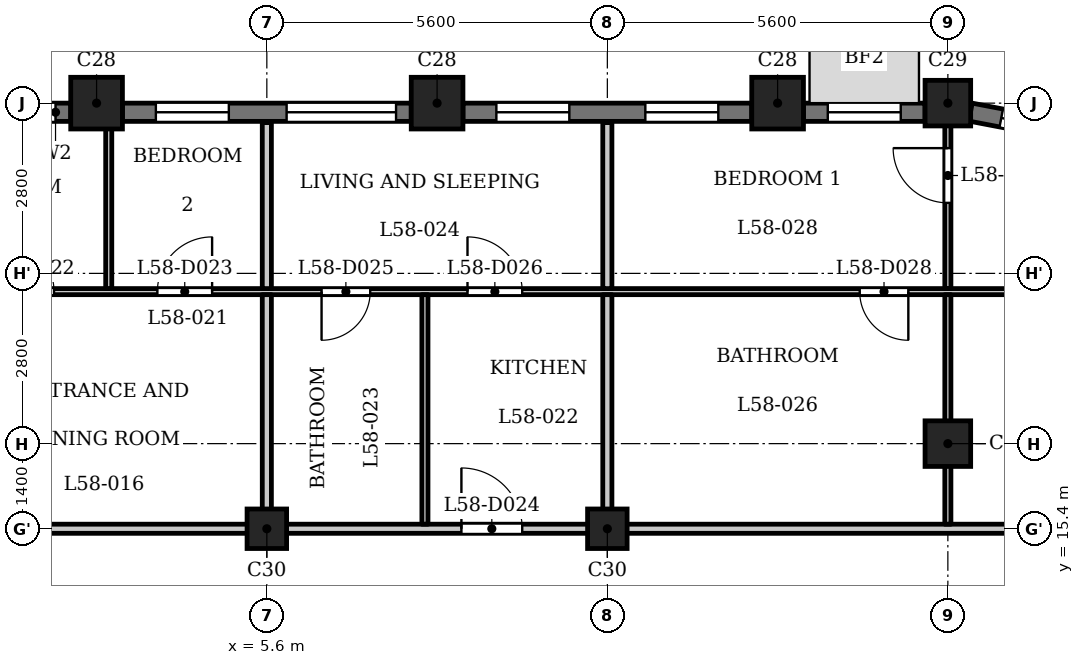
"""IFC4 building model, lengths in metres.
Left out: names, types, materials, properties, quantities, classifications, styles, units other than length and angle.
Written with IfcOpenShell. Run it as: python <this file> out.ifc"""

import sys

from ifc_helpers import new_model, si_unit, direction, frame, frame_2d, origin, origin_2d, place, context, subcontext, project, spatial, rectangle, extrude, element, fill, save


model = new_model("IFC4")
c1 = context("Model", 3, precision=1e-05, world=origin(), true_north=direction((0.0, 1.0)))
c2 = subcontext(c1, "Body", "Model", "MODEL_VIEW")
j1 = project(units=[si_unit("LENGTHUNIT", "METRE"), si_unit("PLANEANGLEUNIT", "RADIAN")], contexts=[c1])
p1 = place(None, origin())
s1 = spatial("IfcSite", under=j1, at=p1, CompositionType="ELEMENT")
p2 = place(p1, origin())
s2 = spatial("IfcBuilding", under=s1, at=p2, CompositionType="ELEMENT")
p3 = place(p2, frame((0.0, 0.0, 223.9)))
s3 = spatial("IfcBuildingStorey", under=s2, at=p3, CompositionType="ELEMENT", Elevation=223.9)
for number, where, z_axis, x_axis in (
    (1, (14.0, 22.4, 0.0), (0.0, 0.0, 1.0), (1.0, 0.0, 0.0)),
    (2, (8.4, 22.4, 0.0), (0.0, 0.0, 1.0), (1.0, 0.0, 0.0)),
    (3, (2.8, 22.4, 0.0), (0.0, 0.0, 1.0), (1.0, 0.0, 0.0)),
):
    element("IfcColumn", number, at=place(p3, frame(where, z_axis=z_axis, x_axis=x_axis)), inside=s3, PredefinedType="COLUMN", context=c2, shape_type="SweptSolid", body=[
        extrude(rectangle(XDim=0.85, YDim=0.85, at=origin_2d()), origin(), (0.0, 0.0, 1.0), 3.5),
    ])
for number, where, z_axis, x_axis in (
    (4, (16.8, 16.8, 0.0), (0.0, 0.0, 1.0), (1.0, 0.0, 0.0)),
    (5, (16.8, 22.4, 0.0), (0.0, 0.0, 1.0), (1.0, 0.0, 0.0)),
):
    element("IfcColumn", number, at=place(p3, frame(where, z_axis=z_axis, x_axis=x_axis)), inside=s3, PredefinedType="COLUMN", context=c2, shape_type="SweptSolid", body=[
        extrude(rectangle(XDim=0.75, YDim=0.75, at=origin_2d()), origin(), (0.0, 0.0, 1.0), 3.5),
    ])
for number, where, z_axis, x_axis in (
    (6, (5.6, 15.4, 0.0), (0.0, 0.0, 1.0), (1.0, 0.0, 0.0)),
    (7, (11.2, 15.4, 0.0), (0.0, 0.0, 1.0), (1.0, 0.0, 0.0)),
):
    element("IfcColumn", number, at=place(p3, frame(where, z_axis=z_axis, x_axis=x_axis)), inside=s3, PredefinedType="COLUMN", context=c2, shape_type="SweptSolid", body=[
        extrude(rectangle(XDim=0.65, YDim=0.65, at=origin_2d()), origin(), (0.0, 0.0, 1.0), 3.5),
    ])
p4 = place(p3, frame((18.971, 21.91, 0.0), z_axis=(0.0, 0.0, 1.0), x_axis=(-0.982300037503, 0.187314271538, 0.0)))
e8 = element("IfcWall", 8, at=p4, inside=s3, PredefinedType="SOLIDWALL", context=c2, shape_type="SweptSolid", body=[
    extrude(rectangle(XDim=1.831, YDim=0.3, at=frame_2d((0.916, 0.0))), origin(), (0.0, 0.0, 1.0), 2.5),
])
p5 = place(p4, frame((0.516, 0.0, 0.6)))
e9 = element("IfcOpeningElement", 9, at=p5, cuts=e8, PredefinedType="OPENING", context=c2, shape_type="SweptSolid", body=[
    extrude(rectangle(XDim=0.8, YDim=1.55, at=frame_2d((0.4, 0.775))), frame((0.0, 0.16, 0.0), z_axis=(0.0, -1.0, 0.0), x_axis=(1.0, 0.0, 0.0)), (0.0, 0.0, 1.0), 0.32),
])
p6 = place(p3, frame((16.425, 22.25, 0.0), z_axis=(0.0, 0.0, 1.0), x_axis=(-1.0, 0.0, 0.0)))
e10 = element("IfcWall", 10, at=p6, inside=s3, PredefinedType="SOLIDWALL", context=c2, shape_type="SweptSolid", body=[
    extrude(rectangle(XDim=2.0, YDim=0.3, at=frame_2d((1.0, 0.0))), origin(), (0.0, 0.0, 1.0), 2.5),
])
p7 = place(p6, frame((0.4, 0.0, 0.6)))
e11 = element("IfcOpeningElement", 11, at=p7, cuts=e10, PredefinedType="OPENING", context=c2, shape_type="SweptSolid", body=[
    extrude(rectangle(XDim=1.2, YDim=1.55, at=frame_2d((0.6, 0.775))), frame((0.0, 0.16, 0.0), z_axis=(0.0, -1.0, 0.0), x_axis=(1.0, 0.0, 0.0)), (0.0, 0.0, 1.0), 0.32),
])
p8 = place(p3, frame((13.575, 22.25, 0.0), z_axis=(0.0, 0.0, 1.0), x_axis=(-1.0, 0.0, 0.0)))
e12 = element("IfcWall", 12, at=p8, inside=s3, PredefinedType="SOLIDWALL", context=c2, shape_type="SweptSolid", body=[
    extrude(rectangle(XDim=4.75, YDim=0.3, at=frame_2d((2.375, 0.0))), origin(), (0.0, 0.0, 1.0), 2.5),
])
p9 = place(p8, frame((0.55, 0.0, 0.6)))
e13 = element("IfcOpeningElement", 13, at=p9, cuts=e12, PredefinedType="OPENING", context=c2, shape_type="SweptSolid", body=[
    extrude(rectangle(XDim=1.2, YDim=1.55, at=frame_2d((0.6, 0.775))), frame((0.0, 0.16, 0.0), z_axis=(0.0, -1.0, 0.0), x_axis=(1.0, 0.0, 0.0)), (0.0, 0.0, 1.0), 0.32),
])
p10 = place(p8, frame((3.0, 0.0, 0.6)))
e14 = element("IfcOpeningElement", 14, at=p10, cuts=e12, PredefinedType="OPENING", context=c2, shape_type="SweptSolid", body=[
    extrude(rectangle(XDim=1.2, YDim=1.55, at=frame_2d((0.6, 0.775))), frame((0.0, 0.16, 0.0), z_axis=(0.0, -1.0, 0.0), x_axis=(1.0, 0.0, 0.0)), (0.0, 0.0, 1.0), 0.32),
])
p11 = place(p3, frame((7.975, 22.25, 0.0), z_axis=(0.0, 0.0, 1.0), x_axis=(-1.0, 0.0, 0.0)))
e15 = element("IfcWall", 15, at=p11, inside=s3, PredefinedType="SOLIDWALL", context=c2, shape_type="SweptSolid", body=[
    extrude(rectangle(XDim=4.75, YDim=0.3, at=frame_2d((2.375, 0.0))), origin(), (0.0, 0.0, 1.0), 2.5),
])
p12 = place(p11, frame((0.25, 0.0, 0.9)))
e16 = element("IfcOpeningElement", 16, at=p12, cuts=e15, PredefinedType="OPENING", context=c2, shape_type="SweptSolid", body=[
    extrude(rectangle(XDim=1.8, YDim=1.25, at=frame_2d((0.9, 0.625))), frame((0.0, 0.16, 0.0), z_axis=(0.0, -1.0, 0.0), x_axis=(1.0, 0.0, 0.0)), (0.0, 0.0, 1.0), 0.32),
])
p13 = place(p11, frame((3.0, 0.0, 0.6)))
e17 = element("IfcOpeningElement", 17, at=p13, cuts=e15, PredefinedType="OPENING", context=c2, shape_type="SweptSolid", body=[
    extrude(rectangle(XDim=1.2, YDim=1.55, at=frame_2d((0.6, 0.775))), frame((0.0, 0.16, 0.0), z_axis=(0.0, -1.0, 0.0), x_axis=(1.0, 0.0, 0.0)), (0.0, 0.0, 1.0), 0.32),
])
p14 = place(p3, frame((2.375, 22.25, 0.0), z_axis=(0.0, 0.0, 1.0), x_axis=(-1.0, 0.0, 0.0)))
e18 = element("IfcWall", 18, at=p14, inside=s3, PredefinedType="SOLIDWALL", context=c2, shape_type="SweptSolid", body=[
    extrude(rectangle(XDim=4.75, YDim=0.3, at=frame_2d((2.375, 0.0))), origin(), (0.0, 0.0, 1.0), 2.5),
])
p15 = place(p14, frame((0.25, 0.0, 0.9)))
e19 = element("IfcOpeningElement", 19, at=p15, cuts=e18, PredefinedType="OPENING", context=c2, shape_type="SweptSolid", body=[
    extrude(rectangle(XDim=1.8, YDim=1.25, at=frame_2d((0.9, 0.625))), frame((0.0, 0.16, 0.0), z_axis=(0.0, -1.0, 0.0), x_axis=(1.0, 0.0, 0.0)), (0.0, 0.0, 1.0), 0.32),
])
p16 = place(p14, frame((2.7, 0.0, 0.9)))
e20 = element("IfcOpeningElement", 20, at=p16, cuts=e18, PredefinedType="OPENING", context=c2, shape_type="SweptSolid", body=[
    extrude(rectangle(XDim=1.8, YDim=1.25, at=frame_2d((0.9, 0.625))), frame((0.0, 0.16, 0.0), z_axis=(0.0, -1.0, 0.0), x_axis=(1.0, 0.0, 0.0)), (0.0, 0.0, 1.0), 0.32),
])
p17 = place(p3, frame((-24.684, 15.4, 0.0), z_axis=(0.0, 0.0, 1.0), x_axis=(1.0, 0.0, 0.0)))
e21 = element("IfcWall", 21, at=p17, inside=s3, PredefinedType="PARTITIONING", context=c2, shape_type="SweptSolid", body=[
    extrude(rectangle(XDim=49.368, YDim=0.15, at=frame_2d((24.684, 0.0))), origin(), (0.0, 0.0, 1.0), 3.2),
])
p18 = place(p17, frame((6.234, 0.0, 0.0)))
e22 = element("IfcOpeningElement", 22, at=p18, cuts=e21, PredefinedType="OPENING", context=c2, shape_type="SweptSolid", body=[
    extrude(rectangle(XDim=1.0, YDim=2.1, at=frame_2d((0.5, 1.05))), frame((0.0, 0.085, 0.0), z_axis=(0.0, -1.0, 0.0), x_axis=(1.0, 0.0, 0.0)), (0.0, 0.0, 1.0), 0.17),
])
p19 = place(p17, frame((17.434, 0.0, 0.0)))
e23 = element("IfcOpeningElement", 23, at=p19, cuts=e21, PredefinedType="OPENING", context=c2, shape_type="SweptSolid", body=[
    extrude(rectangle(XDim=1.0, YDim=2.1, at=frame_2d((0.5, 1.05))), frame((0.0, 0.085, 0.0), z_axis=(0.0, -1.0, 0.0), x_axis=(1.0, 0.0, 0.0)), (0.0, 0.0, 1.0), 0.17),
])
p20 = place(p17, frame((25.384, 0.0, 0.0)))
e24 = element("IfcOpeningElement", 24, at=p20, cuts=e21, PredefinedType="OPENING", context=c2, shape_type="SweptSolid", body=[
    extrude(rectangle(XDim=1.0, YDim=2.1, at=frame_2d((0.5, 1.05))), frame((0.0, 0.085, 0.0), z_axis=(0.0, -1.0, 0.0), x_axis=(1.0, 0.0, 0.0)), (0.0, 0.0, 1.0), 0.17),
])
p21 = place(p17, frame((33.484, 0.0, 0.0)))
e25 = element("IfcOpeningElement", 25, at=p21, cuts=e21, PredefinedType="OPENING", context=c2, shape_type="SweptSolid", body=[
    extrude(rectangle(XDim=1.0, YDim=2.1, at=frame_2d((0.5, 1.05))), frame((0.0, 0.085, 0.0), z_axis=(0.0, -1.0, 0.0), x_axis=(1.0, 0.0, 0.0)), (0.0, 0.0, 1.0), 0.17),
])
p22 = place(p17, frame((47.225, 0.0, 0.0)))
e26 = element("IfcOpeningElement", 26, at=p22, cuts=e21, PredefinedType="OPENING", context=c2, shape_type="SweptSolid", body=[
    extrude(rectangle(XDim=1.0, YDim=2.1, at=frame_2d((0.5, 1.05))), frame((0.0, 0.085, 0.0), z_axis=(0.0, -1.0, 0.0), x_axis=(1.0, 0.0, 0.0)), (0.0, 0.0, 1.0), 0.17),
])
p23 = place(p3, frame((-22.256, 19.3, 0.0), z_axis=(0.0, 0.0, 1.0), x_axis=(1.0, 0.0, 0.0)))
e27 = element("IfcWall", 27, at=p23, inside=s3, PredefinedType="PARTITIONING", context=c2, shape_type="SweptSolid", body=[
    extrude(rectangle(XDim=44.511, YDim=0.1, at=frame_2d((22.256, 0.0))), origin(), (0.0, 0.0, 1.0), 3.2),
])
p24 = place(p23, frame((9.606, 0.0, 0.0)))
e28 = element("IfcOpeningElement", 28, at=p24, cuts=e27, PredefinedType="OPENING", context=c2, shape_type="SweptSolid", body=[
    extrude(rectangle(XDim=0.8, YDim=2.1, at=frame_2d((0.4, 1.05))), frame((0.0, 0.06, 0.0), z_axis=(0.0, -1.0, 0.0), x_axis=(1.0, 0.0, 0.0)), (0.0, 0.0, 1.0), 0.12),
])
p25 = place(p23, frame((3.906, 0.0, 0.0)))
e29 = element("IfcOpeningElement", 29, at=p25, cuts=e27, PredefinedType="OPENING", context=c2, shape_type="SweptSolid", body=[
    extrude(rectangle(XDim=0.9, YDim=2.1, at=frame_2d((0.45, 1.05))), frame((0.0, 0.06, 0.0), z_axis=(0.0, -1.0, 0.0), x_axis=(1.0, 0.0, 0.0)), (0.0, 0.0, 1.0), 0.12),
])
p26 = place(p23, frame((11.706, 0.0, 0.0)))
e30 = element("IfcOpeningElement", 30, at=p26, cuts=e27, PredefinedType="OPENING", context=c2, shape_type="SweptSolid", body=[
    extrude(rectangle(XDim=0.8, YDim=2.1, at=frame_2d((0.4, 1.05))), frame((0.0, 0.06, 0.0), z_axis=(0.0, -1.0, 0.0), x_axis=(1.0, 0.0, 0.0)), (0.0, 0.0, 1.0), 0.12),
])
p27 = place(p23, frame((15.106, 0.0, 0.0)))
e31 = element("IfcOpeningElement", 31, at=p27, cuts=e27, PredefinedType="OPENING", context=c2, shape_type="SweptSolid", body=[
    extrude(rectangle(XDim=0.9, YDim=2.1, at=frame_2d((0.45, 1.05))), frame((0.0, 0.06, 0.0), z_axis=(0.0, -1.0, 0.0), x_axis=(1.0, 0.0, 0.0)), (0.0, 0.0, 1.0), 0.12),
])
p28 = place(p23, frame((17.556, 0.0, 0.0)))
e32 = element("IfcOpeningElement", 32, at=p28, cuts=e27, PredefinedType="OPENING", context=c2, shape_type="SweptSolid", body=[
    extrude(rectangle(XDim=0.8, YDim=2.1, at=frame_2d((0.4, 1.05))), frame((0.0, 0.06, 0.0), z_axis=(0.0, -1.0, 0.0), x_axis=(1.0, 0.0, 0.0)), (0.0, 0.0, 1.0), 0.12),
])
p29 = place(p23, frame((19.956, 0.0, 0.0)))
e33 = element("IfcOpeningElement", 33, at=p29, cuts=e27, PredefinedType="OPENING", context=c2, shape_type="SweptSolid", body=[
    extrude(rectangle(XDim=0.9, YDim=2.1, at=frame_2d((0.45, 1.05))), frame((0.0, 0.06, 0.0), z_axis=(0.0, -1.0, 0.0), x_axis=(1.0, 0.0, 0.0)), (0.0, 0.0, 1.0), 0.12),
])
p30 = place(p23, frame((23.456, 0.0, 0.0)))
e34 = element("IfcOpeningElement", 34, at=p30, cuts=e27, PredefinedType="OPENING", context=c2, shape_type="SweptSolid", body=[
    extrude(rectangle(XDim=0.9, YDim=2.1, at=frame_2d((0.45, 1.05))), frame((0.0, 0.06, 0.0), z_axis=(0.0, -1.0, 0.0), x_axis=(1.0, 0.0, 0.0)), (0.0, 0.0, 1.0), 0.12),
])
p31 = place(p23, frame((26.056, 0.0, 0.0)))
e35 = element("IfcOpeningElement", 35, at=p31, cuts=e27, PredefinedType="OPENING", context=c2, shape_type="SweptSolid", body=[
    extrude(rectangle(XDim=0.9, YDim=2.1, at=frame_2d((0.45, 1.05))), frame((0.0, 0.06, 0.0), z_axis=(0.0, -1.0, 0.0), x_axis=(1.0, 0.0, 0.0)), (0.0, 0.0, 1.0), 0.12),
])
p32 = place(p23, frame((28.756, 0.0, 0.0)))
e36 = element("IfcOpeningElement", 36, at=p32, cuts=e27, PredefinedType="OPENING", context=c2, shape_type="SweptSolid", body=[
    extrude(rectangle(XDim=0.8, YDim=2.1, at=frame_2d((0.4, 1.05))), frame((0.0, 0.06, 0.0), z_axis=(0.0, -1.0, 0.0), x_axis=(1.0, 0.0, 0.0)), (0.0, 0.0, 1.0), 0.12),
])
p33 = place(p23, frame((31.156, 0.0, 0.0)))
e37 = element("IfcOpeningElement", 37, at=p33, cuts=e27, PredefinedType="OPENING", context=c2, shape_type="SweptSolid", body=[
    extrude(rectangle(XDim=0.9, YDim=2.1, at=frame_2d((0.45, 1.05))), frame((0.0, 0.06, 0.0), z_axis=(0.0, -1.0, 0.0), x_axis=(1.0, 0.0, 0.0)), (0.0, 0.0, 1.0), 0.12),
])
p34 = place(p23, frame((37.606, 0.0, 0.0)))
e38 = element("IfcOpeningElement", 38, at=p34, cuts=e27, PredefinedType="OPENING", context=c2, shape_type="SweptSolid", body=[
    extrude(rectangle(XDim=0.8, YDim=2.1, at=frame_2d((0.4, 1.05))), frame((0.0, 0.06, 0.0), z_axis=(0.0, -1.0, 0.0), x_axis=(1.0, 0.0, 0.0)), (0.0, 0.0, 1.0), 0.12),
])
p35 = place(p23, frame((42.028, 0.0, 0.0)))
e39 = element("IfcOpeningElement", 39, at=p35, cuts=e27, PredefinedType="OPENING", context=c2, shape_type="SweptSolid", body=[
    extrude(rectangle(XDim=0.9, YDim=2.1, at=frame_2d((0.45, 1.05))), frame((0.0, 0.06, 0.0), z_axis=(0.0, -1.0, 0.0), x_axis=(1.0, 0.0, 0.0)), (0.0, 0.0, 1.0), 0.12),
])
p36 = place(p3, frame((3.0, 19.35, 0.0), z_axis=(0.0, 0.0, 1.0), x_axis=(0.0, 1.0, 0.0)))
e40 = element("IfcWall", 40, at=p36, inside=s3, PredefinedType="PARTITIONING", context=c2, shape_type="SweptSolid", body=[
    extrude(rectangle(XDim=3.455, YDim=0.1, at=frame_2d((1.728, 0.0))), origin(), (0.0, 0.0, 1.0), 3.2),
])
p37 = place(p3, frame((5.6, 15.475, 0.0), z_axis=(0.0, 0.0, 1.0), x_axis=(0.0, 1.0, 0.0)))
e41 = element("IfcWall", 41, at=p37, inside=s3, PredefinedType="PARTITIONING", context=c2, shape_type="SweptSolid", body=[
    extrude(rectangle(XDim=3.775, YDim=0.15, at=frame_2d((1.887, 0.0))), origin(), (0.0, 0.0, 1.0), 3.2),
])
p38 = place(p3, frame((5.6, 19.35, 0.0), z_axis=(0.0, 0.0, 1.0), x_axis=(0.0, 1.0, 0.0)))
e42 = element("IfcWall", 42, at=p38, inside=s3, PredefinedType="PARTITIONING", context=c2, shape_type="SweptSolid", body=[
    extrude(rectangle(XDim=2.73, YDim=0.15, at=frame_2d((1.365, 0.0))), origin(), (0.0, 0.0, 1.0), 3.2),
])
p39 = place(p3, frame((8.2, 15.475, 0.0), z_axis=(0.0, 0.0, 1.0), x_axis=(0.0, 1.0, 0.0)))
e43 = element("IfcWall", 43, at=p39, inside=s3, PredefinedType="PARTITIONING", context=c2, shape_type="SweptSolid", body=[
    extrude(rectangle(XDim=3.775, YDim=0.1, at=frame_2d((1.887, 0.0))), origin(), (0.0, 0.0, 1.0), 3.2),
])
p40 = place(p3, frame((11.2, 15.475, 0.0), z_axis=(0.0, 0.0, 1.0), x_axis=(0.0, 1.0, 0.0)))
e44 = element("IfcWall", 44, at=p40, inside=s3, PredefinedType="PARTITIONING", context=c2, shape_type="SweptSolid", body=[
    extrude(rectangle(XDim=3.775, YDim=0.15, at=frame_2d((1.887, 0.0))), origin(), (0.0, 0.0, 1.0), 3.2),
])
p41 = place(p3, frame((11.2, 19.35, 0.0), z_axis=(0.0, 0.0, 1.0), x_axis=(0.0, 1.0, 0.0)))
e45 = element("IfcWall", 45, at=p41, inside=s3, PredefinedType="PARTITIONING", context=c2, shape_type="SweptSolid", body=[
    extrude(rectangle(XDim=2.73, YDim=0.15, at=frame_2d((1.365, 0.0))), origin(), (0.0, 0.0, 1.0), 3.2),
])
p42 = place(p3, frame((16.8, 15.475, 0.0), z_axis=(0.0, 0.0, 1.0), x_axis=(0.0, 1.0, 0.0)))
e46 = element("IfcWall", 46, at=p42, inside=s3, PredefinedType="PARTITIONING", context=c2, shape_type="SweptSolid", body=[
    extrude(rectangle(XDim=3.775, YDim=0.1, at=frame_2d((1.887, 0.0))), origin(), (0.0, 0.0, 1.0), 2.55),
])
p43 = place(p3, frame((16.8, 19.35, 0.0), z_axis=(0.0, 0.0, 1.0), x_axis=(0.0, 1.0, 0.0)))
e47 = element("IfcWall", 47, at=p43, inside=s3, PredefinedType="PARTITIONING", context=c2, shape_type="SweptSolid", body=[
    extrude(rectangle(XDim=2.96, YDim=0.1, at=frame_2d((1.48, 0.0))), origin(), (0.0, 0.0, 1.0), 2.55),
])
p44 = place(p43, frame((1.41, 0.0, 0.0)))
e48 = element("IfcOpeningElement", 48, at=p44, cuts=e47, PredefinedType="OPENING", context=c2, shape_type="SweptSolid", body=[
    extrude(rectangle(XDim=0.9, YDim=2.1, at=frame_2d((0.45, 1.05))), frame((0.0, 0.06, 0.0), z_axis=(0.0, -1.0, 0.0), x_axis=(1.0, 0.0, 0.0)), (0.0, 0.0, 1.0), 0.12),
])
p45 = place(p30, origin())
e49 = element("IfcDoor", 49, at=p45, inside=s3, OperationType="SINGLE_SWING_RIGHT", PredefinedType="DOOR", context=c2, shape_type="SweptSolid", body=[
    extrude(rectangle(XDim=0.9, YDim=2.1, at=frame_2d((0.45, 1.05))), frame((0.0, 0.025, 0.0), z_axis=(0.0, -1.0, 0.0), x_axis=(1.0, 0.0, 0.0)), (0.0, 0.0, 1.0), 0.05),
])
fill(e34, e49)
p46 = place(p31, origin())
e50 = element("IfcDoor", 50, at=p46, inside=s3, OperationType="SINGLE_SWING_LEFT", PredefinedType="DOOR", context=c2, shape_type="SweptSolid", body=[
    extrude(rectangle(XDim=0.9, YDim=2.1, at=frame_2d((0.45, 1.05))), frame((0.0, 0.025, 0.0), z_axis=(0.0, -1.0, 0.0), x_axis=(1.0, 0.0, 0.0)), (0.0, 0.0, 1.0), 0.05),
])
fill(e35, e50)
p47 = place(p21, origin())
e51 = element("IfcDoor", 51, at=p47, inside=s3, OperationType="SINGLE_SWING_RIGHT", PredefinedType="DOOR", context=c2, shape_type="SweptSolid", body=[
    extrude(rectangle(XDim=1.0, YDim=2.1, at=frame_2d((0.5, 1.05))), frame((0.0, 0.025, 0.0), z_axis=(0.0, -1.0, 0.0), x_axis=(1.0, 0.0, 0.0)), (0.0, 0.0, 1.0), 0.05),
])
fill(e25, e51)
p48 = place(p32, origin())
e52 = element("IfcDoor", 52, at=p48, inside=s3, OperationType="SINGLE_SWING_LEFT", PredefinedType="DOOR", context=c2, shape_type="SweptSolid", body=[
    extrude(rectangle(XDim=0.8, YDim=2.1, at=frame_2d((0.4, 1.05))), frame((0.0, 0.025, 0.0), z_axis=(0.0, -1.0, 0.0), x_axis=(1.0, 0.0, 0.0)), (0.0, 0.0, 1.0), 0.05),
])
fill(e36, e52)
p49 = place(p33, origin())
e53 = element("IfcDoor", 53, at=p49, inside=s3, OperationType="SINGLE_SWING_RIGHT", PredefinedType="DOOR", context=c2, shape_type="SweptSolid", body=[
    extrude(rectangle(XDim=0.9, YDim=2.1, at=frame_2d((0.45, 1.05))), frame((0.0, 0.025, 0.0), z_axis=(0.0, -1.0, 0.0), x_axis=(1.0, 0.0, 0.0)), (0.0, 0.0, 1.0), 0.05),
])
fill(e37, e53)
p50 = place(p34, origin())
e54 = element("IfcDoor", 54, at=p50, inside=s3, OperationType="SINGLE_SWING_RIGHT", PredefinedType="DOOR", context=c2, shape_type="SweptSolid", body=[
    extrude(rectangle(XDim=0.8, YDim=2.1, at=frame_2d((0.4, 1.05))), frame((0.0, 0.025, 0.0), z_axis=(0.0, -1.0, 0.0), x_axis=(1.0, 0.0, 0.0)), (0.0, 0.0, 1.0), 0.05),
])
fill(e38, e54)
p51 = place(p44, origin())
e55 = element("IfcDoor", 55, at=p51, inside=s3, OperationType="SINGLE_SWING_LEFT", PredefinedType="DOOR", context=c2, shape_type="SweptSolid", body=[
    extrude(rectangle(XDim=0.9, YDim=2.1, at=frame_2d((0.45, 1.05))), frame((0.0, 0.025, 0.0), z_axis=(0.0, -1.0, 0.0), x_axis=(1.0, 0.0, 0.0)), (0.0, 0.0, 1.0), 0.05),
])
fill(e48, e55)
p52 = place(p5, origin())
e56 = element("IfcWindow", 56, at=p52, inside=s3, PartitioningType="SINGLE_PANEL", PredefinedType="WINDOW", context=c2, shape_type="SweptSolid", body=[
    extrude(rectangle(XDim=0.8, YDim=1.55, at=frame_2d((0.4, 0.775))), frame((0.0, 0.03, 0.0), z_axis=(0.0, -1.0, 0.0), x_axis=(1.0, 0.0, 0.0)), (0.0, 0.0, 1.0), 0.06),
])
fill(e9, e56)
p53 = place(p7, origin())
e57 = element("IfcWindow", 57, at=p53, inside=s3, PartitioningType="SINGLE_PANEL", PredefinedType="WINDOW", context=c2, shape_type="SweptSolid", body=[
    extrude(rectangle(XDim=1.2, YDim=1.55, at=frame_2d((0.6, 0.775))), frame((0.0, 0.03, 0.0), z_axis=(0.0, -1.0, 0.0), x_axis=(1.0, 0.0, 0.0)), (0.0, 0.0, 1.0), 0.06),
])
fill(e11, e57)
p54 = place(p9, origin())
e58 = element("IfcWindow", 58, at=p54, inside=s3, PartitioningType="SINGLE_PANEL", PredefinedType="WINDOW", context=c2, shape_type="SweptSolid", body=[
    extrude(rectangle(XDim=1.2, YDim=1.55, at=frame_2d((0.6, 0.775))), frame((0.0, 0.03, 0.0), z_axis=(0.0, -1.0, 0.0), x_axis=(1.0, 0.0, 0.0)), (0.0, 0.0, 1.0), 0.06),
])
fill(e13, e58)
p55 = place(p10, origin())
e59 = element("IfcWindow", 59, at=p55, inside=s3, PartitioningType="SINGLE_PANEL", PredefinedType="WINDOW", context=c2, shape_type="SweptSolid", body=[
    extrude(rectangle(XDim=1.2, YDim=1.55, at=frame_2d((0.6, 0.775))), frame((0.0, 0.03, 0.0), z_axis=(0.0, -1.0, 0.0), x_axis=(1.0, 0.0, 0.0)), (0.0, 0.0, 1.0), 0.06),
])
fill(e14, e59)
p56 = place(p12, origin())
e60 = element("IfcWindow", 60, at=p56, inside=s3, PartitioningType="SINGLE_PANEL", PredefinedType="WINDOW", context=c2, shape_type="SweptSolid", body=[
    extrude(rectangle(XDim=1.8, YDim=1.25, at=frame_2d((0.9, 0.625))), frame((0.0, 0.03, 0.0), z_axis=(0.0, -1.0, 0.0), x_axis=(1.0, 0.0, 0.0)), (0.0, 0.0, 1.0), 0.06),
])
fill(e16, e60)
p57 = place(p13, origin())
e61 = element("IfcWindow", 61, at=p57, inside=s3, PartitioningType="SINGLE_PANEL", PredefinedType="WINDOW", context=c2, shape_type="SweptSolid", body=[
    extrude(rectangle(XDim=1.2, YDim=1.55, at=frame_2d((0.6, 0.775))), frame((0.0, 0.03, 0.0), z_axis=(0.0, -1.0, 0.0), x_axis=(1.0, 0.0, 0.0)), (0.0, 0.0, 1.0), 0.06),
])
fill(e17, e61)
p58 = place(p15, origin())
e62 = element("IfcWindow", 62, at=p58, inside=s3, PartitioningType="SINGLE_PANEL", PredefinedType="WINDOW", context=c2, shape_type="SweptSolid", body=[
    extrude(rectangle(XDim=1.8, YDim=1.25, at=frame_2d((0.9, 0.625))), frame((0.0, 0.03, 0.0), z_axis=(0.0, -1.0, 0.0), x_axis=(1.0, 0.0, 0.0)), (0.0, 0.0, 1.0), 0.06),
])
fill(e19, e62)
save(model, sys.argv[1])
